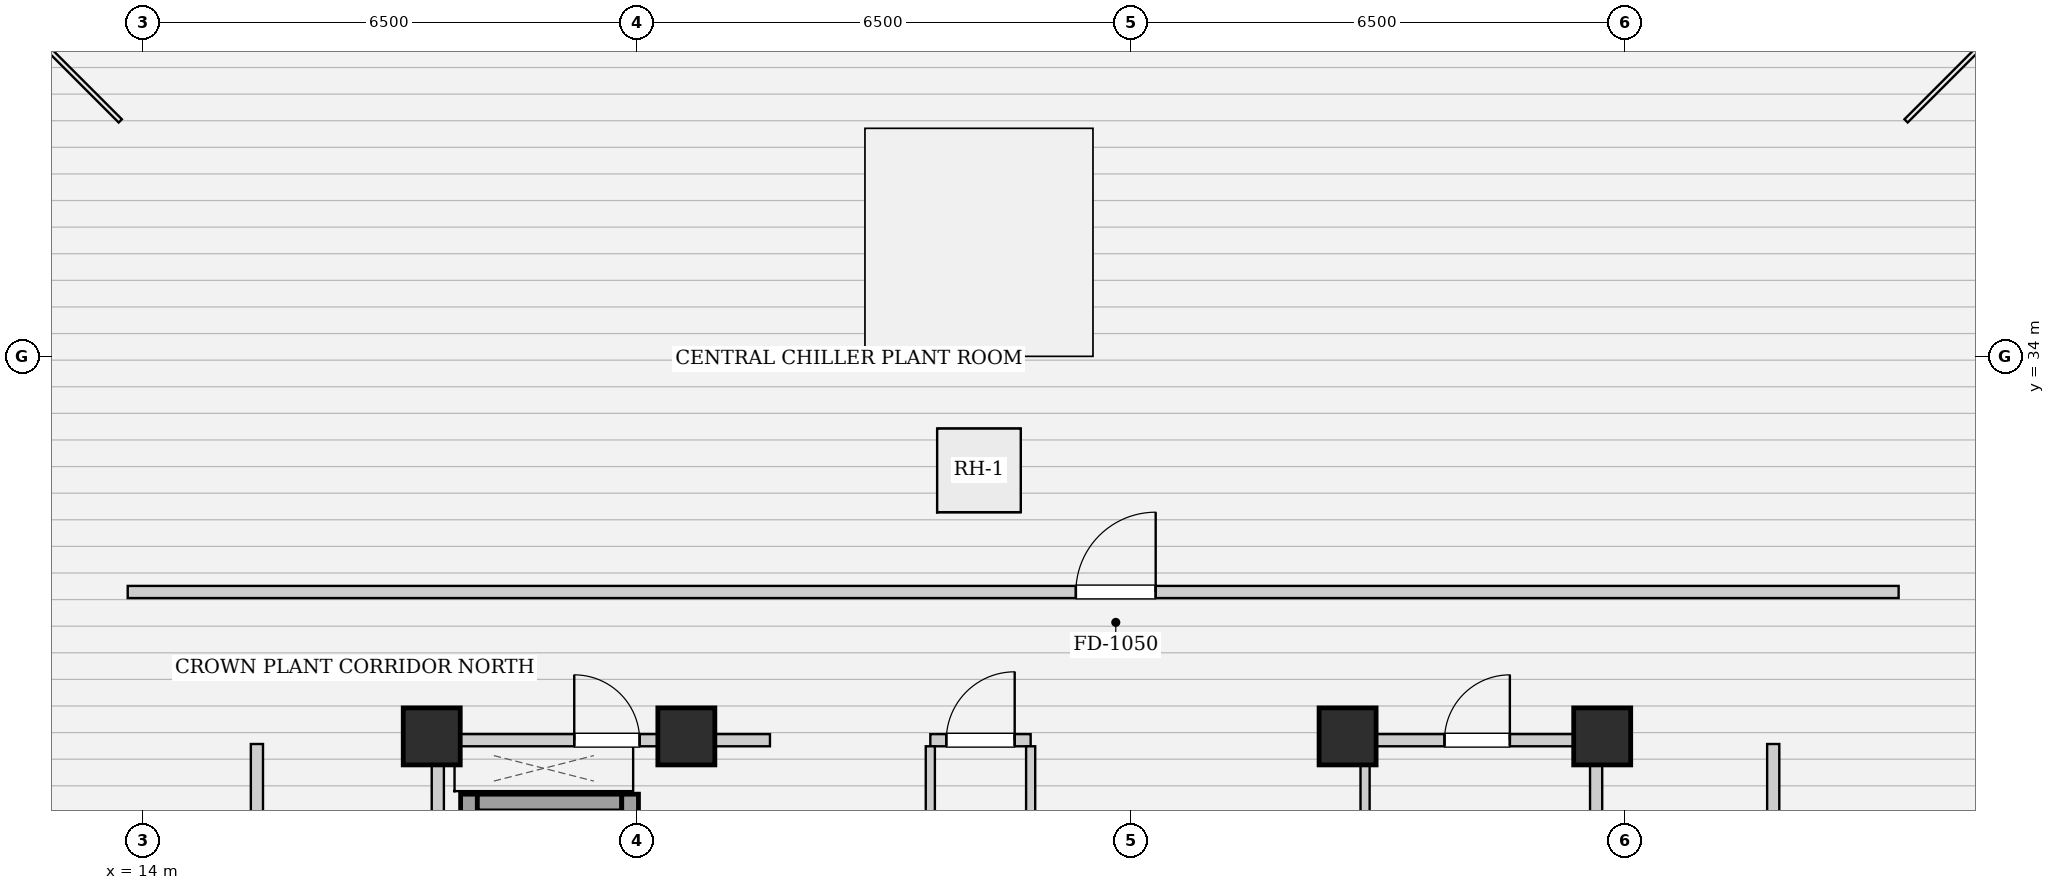
"""IFC4 building model, lengths in metres.
Left out: names, types, materials, properties, quantities, classifications, styles, units other than length and angle.
Written with IfcOpenShell. Run it as: python <this file> out.ifc"""

import sys

from ifc_helpers import new_model, si_unit, direction, frame, frame_2d, origin, origin_2d, place, context, subcontext, project, spatial, rectangle, extrude, element, fill, save


model = new_model("IFC4")
c1 = context("Model", 3, precision=1e-05, world=origin(), true_north=direction((0.0, 1.0)))
c2 = subcontext(c1, "Body", "Model", "MODEL_VIEW")
j1 = project(units=[si_unit("LENGTHUNIT", "METRE"), si_unit("PLANEANGLEUNIT", "RADIAN")], contexts=[c1])
p1 = place(None, origin())
s1 = spatial("IfcSite", under=j1, at=p1, CompositionType="ELEMENT")
p2 = place(p1, origin())
s2 = spatial("IfcBuilding", under=s1, at=p2, CompositionType="ELEMENT")
p3 = place(p2, frame((0.0, 0.0, 261.5)))
s3 = spatial("IfcBuildingStorey", under=s2, at=p3, CompositionType="ELEMENT", Elevation=261.5)
for number, where, z_axis, x_axis in (
    (1, (17.8, 29.0, 0.0), (0.0, 0.0, 1.0), (1.0, 0.0, 0.0)),
    (2, (21.15, 29.0, 0.0), (0.0, 0.0, 1.0), (1.0, 0.0, 0.0)),
    (3, (29.85, 29.0, 0.0), (0.0, 0.0, 1.0), (1.0, 0.0, 0.0)),
    (4, (33.2, 29.0, 0.0), (0.0, 0.0, 1.0), (1.0, 0.0, 0.0)),
):
    element("IfcColumn", number, at=place(p3, frame(where, z_axis=z_axis, x_axis=x_axis)), inside=s3, PredefinedType="COLUMN", context=c2, shape_type="SweptSolid", body=[
        extrude(rectangle(XDim=0.75, YDim=0.75, at=origin_2d()), origin(), (0.0, 0.0, 1.0), 12.95),
    ])
p4 = place(p3, frame((18.29, 24.1, 0.0), z_axis=(0.0, 0.0, 1.0), x_axis=(0.0, 1.0, 0.0)))
e5 = element("IfcWall", 5, at=p4, inside=s3, PredefinedType="SHEAR", context=c2, shape_type="SweptSolid", body=[
    extrude(rectangle(XDim=4.14, YDim=0.22, at=frame_2d((2.07, 0.0))), origin(), (0.0, 0.0, 1.0), 13.2),
])
p5 = place(p3, frame((18.4, 28.13, 0.0), z_axis=(0.0, 0.0, 1.0), x_axis=(1.0, 0.0, 0.0)))
e6 = element("IfcWall", 6, at=p5, inside=s3, PredefinedType="SHEAR", context=c2, shape_type="SweptSolid", body=[
    extrude(rectangle(XDim=1.9, YDim=0.22, at=frame_2d((0.95, 0.0))), origin(), (0.0, 0.0, 1.0), 13.2),
])
p6 = place(p3, frame((20.41, 26.06, 0.0), z_axis=(0.0, 0.0, 1.0), x_axis=(0.0, 1.0, 0.0)))
e7 = element("IfcWall", 7, at=p6, inside=s3, PredefinedType="SHEAR", context=c2, shape_type="SweptSolid", body=[
    extrude(rectangle(XDim=2.18, YDim=0.22, at=frame_2d((1.09, 0.0))), origin(), (0.0, 0.0, 1.0), 13.2),
])
for number, where, z_axis, x_axis in (
    (8, (17.88, 24.12, 0.0), (0.0, 0.0, 1.0), (0.0, 1.0, 0.0)),
    (9, (33.12, 24.12, 0.0), (0.0, 0.0, 1.0), (0.0, 1.0, 0.0)),
):
    element("IfcWall", number, at=place(p3, frame(where, z_axis=z_axis, x_axis=x_axis)), inside=s3, PredefinedType="PARTITIONING", context=c2, shape_type="SweptSolid", body=[
        extrude(rectangle(XDim=4.76, YDim=0.16, at=frame_2d((2.38, 0.0))), origin(), (0.0, 0.0, 1.0), 12.319),
    ])
p7 = place(p3, frame((24.36, 28.95, 0.0), z_axis=(0.0, 0.0, 1.0), x_axis=(1.0, 0.0, 0.0)))
e10 = element("IfcWall", 10, at=p7, inside=s3, PredefinedType="PARTITIONING", context=c2, shape_type="SweptSolid", body=[
    extrude(rectangle(XDim=1.32, YDim=0.16, at=frame_2d((0.66, 0.0))), origin(), (0.0, 0.0, 1.0), 12.319),
])
p8 = place(p7, frame((0.21, 0.0, 0.0)))
e11 = element("IfcOpeningElement", 11, at=p8, cuts=e10, PredefinedType="OPENING", context=c2, shape_type="SweptSolid", body=[
    extrude(rectangle(XDim=0.9, YDim=2.05, at=frame_2d((0.45, 1.025))), frame((0.0, 0.09, 0.0), z_axis=(0.0, -1.0, 0.0), x_axis=(1.0, 0.0, 0.0)), (0.0, 0.0, 1.0), 0.18),
])
p9 = place(p3, frame((17.96, 28.95, 0.0), z_axis=(0.0, 0.0, 1.0), x_axis=(1.0, 0.0, 0.0)))
e12 = element("IfcWall", 12, at=p9, inside=s3, PredefinedType="PARTITIONING", context=c2, shape_type="SweptSolid", body=[
    extrude(rectangle(XDim=4.29, YDim=0.16, at=frame_2d((2.145, 0.0))), origin(), (0.0, 0.0, 1.0), 12.319),
])
p10 = place(p9, frame((1.715, 0.0, 0.0)))
e13 = element("IfcOpeningElement", 13, at=p10, cuts=e12, PredefinedType="OPENING", context=c2, shape_type="SweptSolid", body=[
    extrude(rectangle(XDim=0.86, YDim=2.05, at=frame_2d((0.43, 1.025))), frame((0.0, 0.09, 0.0), z_axis=(0.0, -1.0, 0.0), x_axis=(1.0, 0.0, 0.0)), (0.0, 0.0, 1.0), 0.18),
])
for number, where, z_axis, x_axis in (
    (14, (24.36, 26.6, 0.0), (0.0, 0.0, 1.0), (0.0, 1.0, 0.0)),
    (15, (25.68, 26.6, 0.0), (0.0, 0.0, 1.0), (0.0, 1.0, 0.0)),
):
    element("IfcWall", number, at=place(p3, frame(where, z_axis=z_axis, x_axis=x_axis)), inside=s3, PredefinedType="PARTITIONING", context=c2, shape_type="SweptSolid", body=[
        extrude(rectangle(XDim=2.27, YDim=0.12, at=frame_2d((1.135, 0.0))), origin(), (0.0, 0.0, 1.0), 13.2),
    ])
p11 = place(p3, frame((30.08, 26.18, 0.0), z_axis=(0.0, 0.0, 1.0), x_axis=(0.0, 1.0, 0.0)))
e16 = element("IfcWall", 16, at=p11, inside=s3, PredefinedType="PARTITIONING", context=c2, shape_type="SweptSolid", body=[
    extrude(rectangle(XDim=2.68, YDim=0.12, at=frame_2d((1.34, 0.0))), origin(), (0.0, 0.0, 1.0), 13.2),
])
p12 = place(p3, frame((30.08, 28.95, 0.0), z_axis=(0.0, 0.0, 1.0), x_axis=(1.0, 0.0, 0.0)))
e17 = element("IfcWall", 17, at=p12, inside=s3, PredefinedType="PARTITIONING", context=c2, shape_type="SweptSolid", body=[
    extrude(rectangle(XDim=2.96, YDim=0.16, at=frame_2d((1.48, 0.0))), origin(), (0.0, 0.0, 1.0), 13.2),
])
p13 = place(p12, frame((1.045, 0.0, 0.0)))
e18 = element("IfcOpeningElement", 18, at=p13, cuts=e17, PredefinedType="OPENING", context=c2, shape_type="SweptSolid", body=[
    extrude(rectangle(XDim=0.86, YDim=2.05, at=frame_2d((0.43, 1.025))), frame((0.0, 0.09, 0.0), z_axis=(0.0, -1.0, 0.0), x_axis=(1.0, 0.0, 0.0)), (0.0, 0.0, 1.0), 0.18),
])
p14 = place(p3, frame((13.8, 30.9, 0.0), z_axis=(0.0, 0.0, 1.0), x_axis=(1.0, 0.0, 0.0)))
e19 = element("IfcWall", 19, at=p14, inside=s3, PredefinedType="PARTITIONING", context=c2, shape_type="SweptSolid", body=[
    extrude(rectangle(XDim=23.3, YDim=0.16, at=frame_2d((11.65, 0.0))), origin(), (0.0, 0.0, 1.0), 13.2),
])
p15 = place(p14, frame((12.475, 0.0, 0.0)))
e20 = element("IfcOpeningElement", 20, at=p15, cuts=e19, PredefinedType="OPENING", context=c2, shape_type="SweptSolid", body=[
    extrude(rectangle(XDim=1.05, YDim=2.05, at=frame_2d((0.525, 1.025))), frame((0.0, 0.09, 0.0), z_axis=(0.0, -1.0, 0.0), x_axis=(1.0, 0.0, 0.0)), (0.0, 0.0, 1.0), 0.18),
])
p16 = place(p3, frame((15.5, 15.1, 0.0), z_axis=(0.0, 0.0, 1.0), x_axis=(0.0, 1.0, 0.0)))
e21 = element("IfcWall", 21, at=p16, inside=s3, PredefinedType="PARTITIONING", context=c2, shape_type="SweptSolid", body=[
    extrude(rectangle(XDim=13.8, YDim=0.16, at=frame_2d((6.9, 0.0))), origin(), (0.0, 0.0, 1.0), 13.2),
])
p17 = place(p16, frame((6.475, 0.0, 0.0)))
e22 = element("IfcOpeningElement", 22, at=p17, cuts=e21, PredefinedType="OPENING", context=c2, shape_type="SweptSolid", body=[
    extrude(rectangle(XDim=1.05, YDim=2.05, at=frame_2d((0.525, 1.025))), frame((0.0, 0.09, 0.0), z_axis=(0.0, -1.0, 0.0), x_axis=(1.0, 0.0, 0.0)), (0.0, 0.0, 1.0), 0.18),
])
p18 = place(p3, frame((35.45, 15.1, 0.0), z_axis=(0.0, 0.0, 1.0), x_axis=(0.0, 1.0, 0.0)))
e23 = element("IfcWall", 23, at=p18, inside=s3, PredefinedType="PARTITIONING", context=c2, shape_type="SweptSolid", body=[
    extrude(rectangle(XDim=13.8, YDim=0.16, at=frame_2d((6.9, 0.0))), origin(), (0.0, 0.0, 1.0), 13.2),
])
p19 = place(p18, frame((6.475, 0.0, 0.0)))
e24 = element("IfcOpeningElement", 24, at=p19, cuts=e23, PredefinedType="OPENING", context=c2, shape_type="SweptSolid", body=[
    extrude(rectangle(XDim=1.05, YDim=2.05, at=frame_2d((0.525, 1.025))), frame((0.0, 0.09, 0.0), z_axis=(0.0, -1.0, 0.0), x_axis=(1.0, 0.0, 0.0)), (0.0, 0.0, 1.0), 0.18),
])
p20 = place(p3, frame((0.0, 0.0, 12.95)))
p21 = place(p20, frame((25.0, 32.5, 0.25)))
e25 = element("IfcDoor", 25, at=p21, inside=s3, OperationType="SINGLE_SWING_LEFT", PredefinedType="TRAPDOOR", context=c2, shape_type="SweptSolid", body=[
    extrude(rectangle(XDim=1.1, YDim=1.1, at=origin_2d()), origin(), (0.0, 0.0, 1.0), 0.05),
])
p22 = place(p8, origin())
e26 = element("IfcDoor", 26, at=p22, inside=s3, OperationType="SINGLE_SWING_RIGHT", PredefinedType="DOOR", context=c2, shape_type="SweptSolid", body=[
    extrude(rectangle(XDim=0.9, YDim=2.05, at=frame_2d((0.45, 1.025))), frame((0.0, 0.025, 0.0), z_axis=(0.0, -1.0, 0.0), x_axis=(1.0, 0.0, 0.0)), (0.0, 0.0, 1.0), 0.05),
])
fill(e11, e26)
p23 = place(p10, origin())
e27 = element("IfcDoor", 27, at=p23, inside=s3, OperationType="SINGLE_SWING_LEFT", PredefinedType="DOOR", context=c2, shape_type="SweptSolid", body=[
    extrude(rectangle(XDim=0.86, YDim=2.05, at=frame_2d((0.43, 1.025))), frame((0.0, 0.025, 0.0), z_axis=(0.0, -1.0, 0.0), x_axis=(1.0, 0.0, 0.0)), (0.0, 0.0, 1.0), 0.05),
])
fill(e13, e27)
p24 = place(p13, origin())
e28 = element("IfcDoor", 28, at=p24, inside=s3, OperationType="SINGLE_SWING_RIGHT", PredefinedType="DOOR", context=c2, shape_type="SweptSolid", body=[
    extrude(rectangle(XDim=0.86, YDim=2.05, at=frame_2d((0.43, 1.025))), frame((0.0, 0.025, 0.0), z_axis=(0.0, -1.0, 0.0), x_axis=(1.0, 0.0, 0.0)), (0.0, 0.0, 1.0), 0.05),
])
fill(e18, e28)
p25 = place(p15, origin())
e29 = element("IfcDoor", 29, at=p25, inside=s3, OperationType="SINGLE_SWING_RIGHT", PredefinedType="DOOR", context=c2, shape_type="SweptSolid", body=[
    extrude(rectangle(XDim=1.05, YDim=2.05, at=frame_2d((0.525, 1.025))), frame((0.0, 0.025, 0.0), z_axis=(0.0, -1.0, 0.0), x_axis=(1.0, 0.0, 0.0)), (0.0, 0.0, 1.0), 0.05),
])
fill(e20, e29)
save(model, sys.argv[1])
